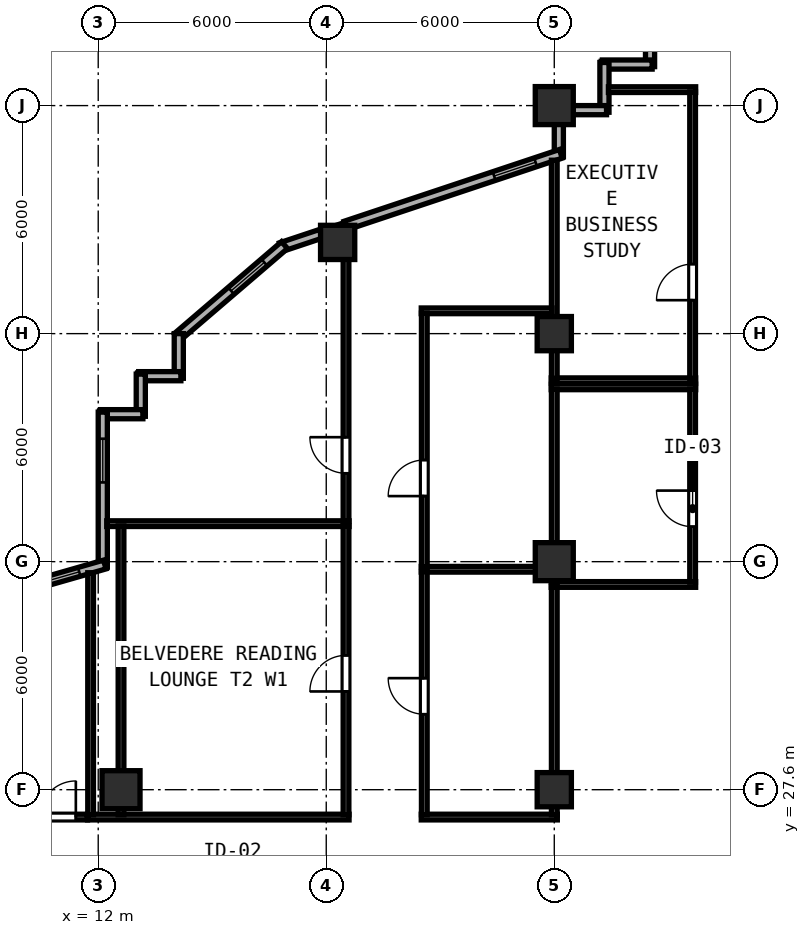
"""IFC4 building model, lengths in metres.
Left out: names, types, materials, properties, quantities, classifications, styles, units other than length and angle.
Written with IfcOpenShell. Run it as: python <this file> out.ifc"""

import sys

from ifc_helpers import new_model, si_unit, direction, frame, frame_2d, origin, origin_2d, place, context, subcontext, project, spatial, rectangle, hollow_rectangle, extrude, element, fill, save


model = new_model("IFC4")
c1 = context("Model", 3, precision=1e-05, world=origin(), true_north=direction((0.0, 1.0)))
c2 = subcontext(c1, "Body", "Model", "MODEL_VIEW")
j1 = project(units=[si_unit("LENGTHUNIT", "METRE"), si_unit("PLANEANGLEUNIT", "RADIAN")], contexts=[c1])
p1 = place(None, origin())
s1 = spatial("IfcSite", under=j1, at=p1, CompositionType="ELEMENT")
p2 = place(p1, origin())
s2 = spatial("IfcBuilding", under=s1, at=p2, CompositionType="ELEMENT")
p3 = place(p2, frame((0.0, 0.0, 128.8)))
s3 = spatial("IfcBuildingStorey", under=s2, at=p3, CompositionType="ELEMENT", Elevation=128.8)
for number, where, z_axis, x_axis in (
    (1, (24.0, 33.6, 0.0), (0.0, 0.0, 1.0), (1.0, 0.0, 0.0)),
    (2, (24.0, 45.6, 0.0), (0.0, 0.0, 1.0), (1.0, 0.0, 0.0)),
    (3, (12.6, 27.6, 0.0), (0.0, 0.0, 1.0), (1.0, 0.0, 0.0)),
):
    element("IfcColumn", number, at=place(p3, frame(where, z_axis=z_axis, x_axis=x_axis)), inside=s3, PredefinedType="COLUMN", context=c2, shape_type="SweptSolid", body=[
        extrude(hollow_rectangle(XDim=1.0, YDim=1.0, WallThickness=0.038, at=origin_2d()), origin(), (0.0, 0.0, 1.0), 3.8),
    ])
for number, where, z_axis, x_axis in (
    (4, (24.0, 27.6, 0.0), (0.0, 0.0, 1.0), (1.0, 0.0, 0.0)),
    (5, (24.0, 39.6, 0.0), (0.0, 0.0, 1.0), (1.0, 0.0, 0.0)),
    (6, (18.3, 42.0, 0.0), (0.0, 0.0, 1.0), (1.0, 0.0, 0.0)),
):
    element("IfcColumn", number, at=place(p3, frame(where, z_axis=z_axis, x_axis=x_axis)), inside=s3, PredefinedType="COLUMN", context=c2, shape_type="SweptSolid", body=[
        extrude(hollow_rectangle(XDim=0.9, YDim=0.9, WallThickness=0.034, at=origin_2d()), origin(), (0.0, 0.0, 1.0), 3.8),
    ])
p4 = place(p3, frame((26.52, 47.995, 0.0), z_axis=(0.0, 0.0, 1.0), x_axis=(0.0, -1.0, 0.0)))
e7 = element("IfcWall", 7, at=p4, inside=s3, PredefinedType="SOLIDWALL", context=c2, shape_type="SweptSolid", body=[
    extrude(rectangle(XDim=1.37, YDim=0.24, at=frame_2d((0.685, 0.0))), origin(), (0.0, 0.0, 1.0), 3.6),
])
for number, where, z_axis, x_axis in (
    (8, (26.575, 46.68, 0.0), (0.0, 0.0, 1.0), (-1.0, 0.0, 0.0)),
    (9, (25.32, 46.735, 0.0), (0.0, 0.0, 1.0), (0.0, -1.0, 0.0)),
):
    element("IfcWall", number, at=place(p3, frame(where, z_axis=z_axis, x_axis=x_axis)), inside=s3, PredefinedType="SOLIDWALL", context=c2, shape_type="SweptSolid", body=[
        extrude(rectangle(XDim=1.31, YDim=0.24, at=frame_2d((0.655, 0.0))), origin(), (0.0, 0.0, 1.0), 3.6),
    ])
p5 = place(p3, frame((25.375, 45.48, 0.0), z_axis=(0.0, 0.0, 1.0), x_axis=(-1.0, 0.0, 0.0)))
e10 = element("IfcWall", 10, at=p5, inside=s3, PredefinedType="SOLIDWALL", context=c2, shape_type="SweptSolid", body=[
    extrude(rectangle(XDim=0.883, YDim=0.24, at=frame_2d((0.441, 0.0))), origin(), (0.0, 0.0, 1.0), 3.6),
])
p6 = place(p3, frame((24.12, 45.108, 0.0), z_axis=(0.0, 0.0, 1.0), x_axis=(0.0, -1.0, 0.0)))
e11 = element("IfcWall", 11, at=p6, inside=s3, PredefinedType="SOLIDWALL", context=c2, shape_type="SweptSolid", body=[
    extrude(rectangle(XDim=0.849, YDim=0.24, at=frame_2d((0.425, 0.0))), origin(), (0.0, 0.0, 1.0), 3.145),
])
p7 = place(p3, frame((24.172, 44.331, 0.0), z_axis=(0.0, 0.0, 1.0), x_axis=(-0.948683298051, -0.316227766017, 0.0)))
e12 = element("IfcWall", 12, at=p7, inside=s3, PredefinedType="SOLIDWALL", context=c2, shape_type="SweptSolid", body=[
    extrude(rectangle(XDim=5.973, YDim=0.24, at=frame_2d((2.987, 0.0))), origin(), (0.0, 0.0, 1.0), 3.145),
])
p8 = place(p7, frame((0.7, 0.0, 0.85)))
e13 = element("IfcOpeningElement", 13, at=p8, cuts=e12, PredefinedType="OPENING", context=c2, shape_type="SweptSolid", body=[
    extrude(rectangle(XDim=1.15, YDim=1.8, at=frame_2d((0.575, 0.9))), frame((0.0, 0.13, 0.0), z_axis=(0.0, -1.0, 0.0), x_axis=(1.0, 0.0, 0.0)), (0.0, 0.0, 1.0), 0.26),
])
p9 = place(p3, frame((17.858, 42.226, 0.0), z_axis=(0.0, 0.0, 1.0), x_axis=(-0.948639166064, -0.316360131194, 0.0)))
e14 = element("IfcWall", 14, at=p9, inside=s3, PredefinedType="SOLIDWALL", context=c2, shape_type="SweptSolid", body=[
    extrude(rectangle(XDim=1.107, YDim=0.24, at=frame_2d((0.553, 0.0))), origin(), (0.0, 0.0, 1.0), 3.6),
])
p10 = place(p3, frame((16.902, 41.929, 0.0), z_axis=(0.0, 0.0, 1.0), x_axis=(-0.759275136126, -0.650769750112, 0.0)))
e15 = element("IfcWall", 15, at=p10, inside=s3, PredefinedType="SOLIDWALL", context=c2, shape_type="SweptSolid", body=[
    extrude(rectangle(XDim=3.719, YDim=0.24, at=frame_2d((1.86, 0.0))), origin(), (0.0, 0.0, 1.0), 3.6),
])
p11 = place(p10, frame((0.7, 0.0, 0.85)))
e16 = element("IfcOpeningElement", 16, at=p11, cuts=e15, PredefinedType="OPENING", context=c2, shape_type="SweptSolid", body=[
    extrude(rectangle(XDim=1.15, YDim=1.8, at=frame_2d((0.575, 0.9))), frame((0.0, 0.13, 0.0), z_axis=(0.0, -1.0, 0.0), x_axis=(1.0, 0.0, 0.0)), (0.0, 0.0, 1.0), 0.26),
])
p12 = place(p3, frame((14.12, 39.6, 0.0), z_axis=(0.0, 0.0, 1.0), x_axis=(0.0, -1.0, 0.0)))
e17 = element("IfcWall", 17, at=p12, inside=s3, PredefinedType="SOLIDWALL", context=c2, shape_type="SweptSolid", body=[
    extrude(rectangle(XDim=1.175, YDim=0.24, at=frame_2d((0.587, 0.0))), origin(), (0.0, 0.0, 1.0), 3.6),
])
p13 = place(p3, frame((14.175, 38.48, 0.0), z_axis=(0.0, 0.0, 1.0), x_axis=(-1.0, 0.0, 0.0)))
e18 = element("IfcWall", 18, at=p13, inside=s3, PredefinedType="SOLIDWALL", context=c2, shape_type="SweptSolid", body=[
    extrude(rectangle(XDim=1.11, YDim=0.24, at=frame_2d((0.555, 0.0))), origin(), (0.0, 0.0, 1.0), 3.6),
])
p14 = place(p3, frame((13.12, 38.535, 0.0), z_axis=(0.0, 0.0, 1.0), x_axis=(0.0, -1.0, 0.0)))
e19 = element("IfcWall", 19, at=p14, inside=s3, PredefinedType="SOLIDWALL", context=c2, shape_type="SweptSolid", body=[
    extrude(rectangle(XDim=1.11, YDim=0.24, at=frame_2d((0.555, 0.0))), origin(), (0.0, 0.0, 1.0), 3.6),
])
p15 = place(p3, frame((13.175, 37.48, 0.0), z_axis=(0.0, 0.0, 1.0), x_axis=(-1.0, 0.0, 0.0)))
e20 = element("IfcWall", 20, at=p15, inside=s3, PredefinedType="SOLIDWALL", context=c2, shape_type="SweptSolid", body=[
    extrude(rectangle(XDim=1.11, YDim=0.24, at=frame_2d((0.555, 0.0))), origin(), (0.0, 0.0, 1.0), 3.6),
])
p16 = place(p3, frame((12.12, 37.535, 0.0), z_axis=(0.0, 0.0, 1.0), x_axis=(0.0, -1.0, 0.0)))
e21 = element("IfcWall", 21, at=p16, inside=s3, PredefinedType="SOLIDWALL", context=c2, shape_type="SweptSolid", body=[
    extrude(rectangle(XDim=4.08, YDim=0.24, at=frame_2d((2.04, 0.0))), origin(), (0.0, 0.0, 1.0), 3.6),
])
p17 = place(p16, frame((0.7, 0.0, 0.85)))
e22 = element("IfcOpeningElement", 22, at=p17, cuts=e21, PredefinedType="OPENING", context=c2, shape_type="SweptSolid", body=[
    extrude(rectangle(XDim=1.15, YDim=1.8, at=frame_2d((0.575, 0.9))), frame((0.0, 0.13, 0.0), z_axis=(0.0, -1.0, 0.0), x_axis=(1.0, 0.0, 0.0)), (0.0, 0.0, 1.0), 0.26),
])
p18 = place(p3, frame((12.173, 33.525, 0.0), z_axis=(0.0, 0.0, 1.0), x_axis=(-0.961351601853, -0.275323623424, 0.0)))
e23 = element("IfcWall", 23, at=p18, inside=s3, PredefinedType="SOLIDWALL", context=c2, shape_type="SweptSolid", body=[
    extrude(rectangle(XDim=8.883, YDim=0.24, at=frame_2d((4.442, 0.0))), origin(), (0.0, 0.0, 1.0), 3.6),
])
p19 = place(p18, frame((0.7, 0.0, 0.85)))
e24 = element("IfcOpeningElement", 24, at=p19, cuts=e23, PredefinedType="OPENING", context=c2, shape_type="SweptSolid", body=[
    extrude(rectangle(XDim=1.15, YDim=1.8, at=frame_2d((0.575, 0.9))), frame((0.0, 0.13, 0.0), z_axis=(0.0, -1.0, 0.0), x_axis=(1.0, 0.0, 0.0)), (0.0, 0.0, 1.0), 0.26),
])
p20 = place(p18, frame((6.1, 0.0, 0.85)))
e25 = element("IfcOpeningElement", 25, at=p20, cuts=e23, PredefinedType="OPENING", context=c2, shape_type="SweptSolid", body=[
    extrude(rectangle(XDim=1.15, YDim=1.8, at=frame_2d((0.575, 0.9))), frame((0.0, 0.13, 0.0), z_axis=(0.0, -1.0, 0.0), x_axis=(1.0, 0.0, 0.0)), (0.0, 0.0, 1.0), 0.26),
])
for number, where, z_axis, x_axis in (
    (26, (23.92, 38.2, 0.0), (0.0, 0.0, 1.0), (1.0, 0.0, 0.0)),
    (27, (23.92, 33.0, 0.0), (0.0, 0.0, 1.0), (1.0, 0.0, 0.0)),
):
    element("IfcWall", number, at=place(p3, frame(where, z_axis=z_axis, x_axis=x_axis)), inside=s3, PredefinedType="PARTITIONING", context=c2, shape_type="SweptSolid", body=[
        extrude(rectangle(XDim=3.8, YDim=0.15, at=frame_2d((1.9, 0.0))), origin(), (0.0, 0.0, 1.0), 3.6),
    ])
p21 = place(p3, frame((24.0, 33.06, 0.0), z_axis=(0.0, 0.0, 1.0), x_axis=(0.0, 1.0, 0.0)))
e28 = element("IfcWall", 28, at=p21, inside=s3, PredefinedType="PARTITIONING", context=c2, shape_type="SweptSolid", body=[
    extrude(rectangle(XDim=5.08, YDim=0.15, at=frame_2d((2.54, 0.0))), origin(), (0.0, 0.0, 1.0), 3.145),
])
p22 = place(p3, frame((27.64, 33.06, 0.0), z_axis=(0.0, 0.0, 1.0), x_axis=(0.0, 1.0, 0.0)))
e29 = element("IfcWall", 29, at=p22, inside=s3, PredefinedType="PARTITIONING", context=c2, shape_type="SweptSolid", body=[
    extrude(rectangle(XDim=5.08, YDim=0.15, at=frame_2d((2.54, 0.0))), origin(), (0.0, 0.0, 1.0), 3.6),
])
p23 = place(p22, frame((2.41, 0.0, 0.0), z_axis=(0.0, 0.0, 1.0), x_axis=(-1.0, 0.0, 0.0)))
e30 = element("IfcOpeningElement", 30, at=p23, cuts=e29, PredefinedType="OPENING", context=c2, shape_type="SweptSolid", body=[
    extrude(rectangle(XDim=0.95, YDim=2.12, at=frame_2d((0.475, 1.06))), frame((0.0, 0.085, 0.0), z_axis=(0.0, -1.0, 0.0), x_axis=(1.0, 0.0, 0.0)), (0.0, 0.0, 1.0), 0.17),
])
p24 = place(p3, frame((25.425, 46.02, 0.0), z_axis=(0.0, 0.0, 1.0), x_axis=(1.0, 0.0, 0.0)))
e31 = element("IfcWall", 31, at=p24, inside=s3, PredefinedType="PARTITIONING", context=c2, shape_type="SweptSolid", body=[
    extrude(rectangle(XDim=2.295, YDim=0.15, at=frame_2d((1.147, 0.0))), origin(), (0.0, 0.0, 1.0), 3.6),
])
p25 = place(p3, frame((23.92, 38.36, 0.0), z_axis=(0.0, 0.0, 1.0), x_axis=(1.0, 0.0, 0.0)))
e32 = element("IfcWall", 32, at=p25, inside=s3, PredefinedType="PARTITIONING", context=c2, shape_type="SweptSolid", body=[
    extrude(rectangle(XDim=3.8, YDim=0.15, at=frame_2d((1.9, 0.0))), origin(), (0.0, 0.0, 1.0), 3.6),
])
p26 = place(p3, frame((24.0, 38.42, 0.0), z_axis=(0.0, 0.0, 1.0), x_axis=(0.0, 1.0, 0.0)))
e33 = element("IfcWall", 33, at=p26, inside=s3, PredefinedType="PARTITIONING", context=c2, shape_type="SweptSolid", body=[
    extrude(rectangle(XDim=5.743, YDim=0.15, at=frame_2d((2.872, 0.0))), origin(), (0.0, 0.0, 1.0), 3.145),
])
p27 = place(p3, frame((27.64, 38.42, 0.0), z_axis=(0.0, 0.0, 1.0), x_axis=(0.0, 1.0, 0.0)))
e34 = element("IfcWall", 34, at=p27, inside=s3, PredefinedType="PARTITIONING", context=c2, shape_type="SweptSolid", body=[
    extrude(rectangle(XDim=7.54, YDim=0.15, at=frame_2d((3.77, 0.0))), origin(), (0.0, 0.0, 1.0), 3.6),
])
p28 = place(p27, frame((3.01, 0.0, 0.0), z_axis=(0.0, 0.0, 1.0), x_axis=(-1.0, 0.0, 0.0)))
e35 = element("IfcOpeningElement", 35, at=p28, cuts=e34, PredefinedType="OPENING", context=c2, shape_type="SweptSolid", body=[
    extrude(rectangle(XDim=0.95, YDim=2.12, at=frame_2d((0.475, 1.06))), frame((0.0, 0.085, 0.0), z_axis=(0.0, -1.0, 0.0), x_axis=(1.0, 0.0, 0.0)), (0.0, 0.0, 1.0), 0.17),
])
p29 = place(p3, frame((12.225, 34.6, 0.0), z_axis=(0.0, 0.0, 1.0), x_axis=(1.0, 0.0, 0.0)))
e36 = element("IfcWall", 36, at=p29, inside=s3, PredefinedType="PARTITIONING", context=c2, shape_type="SweptSolid", body=[
    extrude(rectangle(XDim=6.375, YDim=0.15, at=frame_2d((3.188, 0.0))), origin(), (0.0, 0.0, 1.0), 3.6),
])
p30 = place(p3, frame((11.72, 26.88, 0.0), z_axis=(0.0, 0.0, 1.0), x_axis=(1.0, 0.0, 0.0)))
e37 = element("IfcWall", 37, at=p30, inside=s3, PredefinedType="PARTITIONING", context=c2, shape_type="SweptSolid", body=[
    extrude(rectangle(XDim=6.88, YDim=0.15, at=frame_2d((3.44, 0.0))), origin(), (0.0, 0.0, 1.0), 3.6),
])
p31 = place(p3, frame((11.8, 26.94, 0.0), z_axis=(0.0, 0.0, 1.0), x_axis=(0.0, 1.0, 0.0)))
e38 = element("IfcWall", 38, at=p31, inside=s3, PredefinedType="PARTITIONING", context=c2, shape_type="SweptSolid", body=[
    extrude(rectangle(XDim=6.369, YDim=0.15, at=frame_2d((3.184, 0.0))), origin(), (0.0, 0.0, 1.0), 3.6),
])
p32 = place(p3, frame((18.52, 26.94, 0.0), z_axis=(0.0, 0.0, 1.0), x_axis=(0.0, 1.0, 0.0)))
e39 = element("IfcWall", 39, at=p32, inside=s3, PredefinedType="PARTITIONING", context=c2, shape_type="SweptSolid", body=[
    extrude(rectangle(XDim=7.6, YDim=0.15, at=frame_2d((3.8, 0.0))), origin(), (0.0, 0.0, 1.0), 3.6),
])
p33 = place(p32, frame((4.195, 0.0, 0.0), z_axis=(0.0, 0.0, 1.0), x_axis=(-1.0, 0.0, 0.0)))
e40 = element("IfcOpeningElement", 40, at=p33, cuts=e39, PredefinedType="OPENING", context=c2, shape_type="SweptSolid", body=[
    extrude(rectangle(XDim=0.95, YDim=2.12, at=frame_2d((0.475, 1.06))), frame((0.0, 0.085, 0.0), z_axis=(0.0, -1.0, 0.0), x_axis=(1.0, 0.0, 0.0)), (0.0, 0.0, 1.0), 0.17),
])
p34 = place(p3, frame((18.52, 34.66, 0.0), z_axis=(0.0, 0.0, 1.0), x_axis=(0.0, 1.0, 0.0)))
e41 = element("IfcWall", 41, at=p34, inside=s3, PredefinedType="PARTITIONING", context=c2, shape_type="SweptSolid", body=[
    extrude(rectangle(XDim=7.676, YDim=0.15, at=frame_2d((3.838, 0.0))), origin(), (0.0, 0.0, 1.0), 3.6),
])
p35 = place(p34, frame((2.215, 0.0, 0.0), z_axis=(0.0, 0.0, 1.0), x_axis=(-1.0, 0.0, 0.0)))
e42 = element("IfcOpeningElement", 42, at=p35, cuts=e41, PredefinedType="OPENING", context=c2, shape_type="SweptSolid", body=[
    extrude(rectangle(XDim=0.95, YDim=2.12, at=frame_2d((0.475, 1.06))), frame((0.0, 0.085, 0.0), z_axis=(0.0, -1.0, 0.0), x_axis=(1.0, 0.0, 0.0)), (0.0, 0.0, 1.0), 0.17),
])
p36 = place(p3, frame((20.5, 33.4, 0.0), z_axis=(0.0, 0.0, 1.0), x_axis=(1.0, 0.0, 0.0)))
e43 = element("IfcWall", 43, at=p36, inside=s3, PredefinedType="PARTITIONING", context=c2, shape_type="SweptSolid", body=[
    extrude(rectangle(XDim=3.44, YDim=0.15, at=frame_2d((1.72, 0.0))), origin(), (0.0, 0.0, 1.0), 3.6),
])
p37 = place(p3, frame((20.5, 26.88, 0.0), z_axis=(0.0, 0.0, 1.0), x_axis=(1.0, 0.0, 0.0)))
e44 = element("IfcWall", 44, at=p37, inside=s3, PredefinedType="PARTITIONING", context=c2, shape_type="SweptSolid", body=[
    extrude(rectangle(XDim=3.58, YDim=0.15, at=frame_2d((1.79, 0.0))), origin(), (0.0, 0.0, 1.0), 3.6),
])
p38 = place(p3, frame((20.58, 26.94, 0.0), z_axis=(0.0, 0.0, 1.0), x_axis=(0.0, 1.0, 0.0)))
e45 = element("IfcWall", 45, at=p38, inside=s3, PredefinedType="PARTITIONING", context=c2, shape_type="SweptSolid", body=[
    extrude(rectangle(XDim=6.4, YDim=0.15, at=frame_2d((3.2, 0.0))), origin(), (0.0, 0.0, 1.0), 3.6),
])
p39 = place(p38, frame((2.645, 0.0, 0.0)))
e46 = element("IfcOpeningElement", 46, at=p39, cuts=e45, PredefinedType="OPENING", context=c2, shape_type="SweptSolid", body=[
    extrude(rectangle(XDim=0.95, YDim=2.12, at=frame_2d((0.475, 1.06))), frame((0.0, 0.085, 0.0), z_axis=(0.0, -1.0, 0.0), x_axis=(1.0, 0.0, 0.0)), (0.0, 0.0, 1.0), 0.17),
])
p40 = place(p3, frame((24.0, 26.94, 0.0), z_axis=(0.0, 0.0, 1.0), x_axis=(0.0, 1.0, 0.0)))
e47 = element("IfcWall", 47, at=p40, inside=s3, PredefinedType="PARTITIONING", context=c2, shape_type="SweptSolid", body=[
    extrude(rectangle(XDim=6.0, YDim=0.15, at=frame_2d((3.0, 0.0))), origin(), (0.0, 0.0, 1.0), 3.145),
])
p41 = place(p3, frame((20.5, 40.2, 0.0), z_axis=(0.0, 0.0, 1.0), x_axis=(1.0, 0.0, 0.0)))
e48 = element("IfcWall", 48, at=p41, inside=s3, PredefinedType="PARTITIONING", context=c2, shape_type="SweptSolid", body=[
    extrude(rectangle(XDim=3.44, YDim=0.15, at=frame_2d((1.72, 0.0))), origin(), (0.0, 0.0, 1.0), 3.6),
])
p42 = place(p3, frame((20.58, 33.46, 0.0), z_axis=(0.0, 0.0, 1.0), x_axis=(0.0, 1.0, 0.0)))
e49 = element("IfcWall", 49, at=p42, inside=s3, PredefinedType="PARTITIONING", context=c2, shape_type="SweptSolid", body=[
    extrude(rectangle(XDim=6.68, YDim=0.15, at=frame_2d((3.34, 0.0))), origin(), (0.0, 0.0, 1.0), 3.6),
])
p43 = place(p42, frame((1.865, 0.0, 0.0)))
e50 = element("IfcOpeningElement", 50, at=p43, cuts=e49, PredefinedType="OPENING", context=c2, shape_type="SweptSolid", body=[
    extrude(rectangle(XDim=0.95, YDim=2.12, at=frame_2d((0.475, 1.06))), frame((0.0, 0.085, 0.0), z_axis=(0.0, -1.0, 0.0), x_axis=(1.0, 0.0, 0.0)), (0.0, 0.0, 1.0), 0.17),
])
p44 = place(p3, frame((1.645, 26.88, 0.0), z_axis=(0.0, 0.0, 1.0), x_axis=(1.0, 0.0, 0.0)))
e51 = element("IfcWall", 51, at=p44, inside=s3, PredefinedType="PARTITIONING", context=c2, shape_type="SweptSolid", body=[
    extrude(rectangle(XDim=10.073, YDim=0.15, at=frame_2d((5.037, 0.0))), origin(), (0.0, 0.0, 1.0), 3.6),
])
p45 = place(p44, frame((8.816, 0.0, 0.0)))
e52 = element("IfcOpeningElement", 52, at=p45, cuts=e51, PredefinedType="OPENING", context=c2, shape_type="SweptSolid", body=[
    extrude(rectangle(XDim=0.95, YDim=2.15, at=frame_2d((0.475, 1.075))), frame((0.0, 0.085, 0.0), z_axis=(0.0, -1.0, 0.0), x_axis=(1.0, 0.0, 0.0)), (0.0, 0.0, 1.0), 0.17),
])
p46 = place(p3, frame((12.6, 26.94, 0.0), z_axis=(0.0, 0.0, 1.0), x_axis=(0.0, 1.0, 0.0)))
e53 = element("IfcWall", 53, at=p46, inside=s3, PredefinedType="PARTITIONING", context=c2, shape_type="SweptSolid", body=[
    extrude(rectangle(XDim=7.6, YDim=0.15, at=frame_2d((3.8, 0.0))), origin(), (0.0, 0.0, 1.0), 3.145),
])
p47 = place(p8, origin())
e54 = element("IfcWindow", 54, at=p47, inside=s3, PartitioningType="SINGLE_PANEL", PredefinedType="WINDOW", context=c2, shape_type="SweptSolid", body=[
    extrude(rectangle(XDim=1.15, YDim=1.8, at=frame_2d((0.575, 0.9))), frame((0.0, 0.03, 0.0), z_axis=(0.0, -1.0, 0.0), x_axis=(1.0, 0.0, 0.0)), (0.0, 0.0, 1.0), 0.06),
])
fill(e13, e54)
p48 = place(p11, origin())
e55 = element("IfcWindow", 55, at=p48, inside=s3, PartitioningType="SINGLE_PANEL", PredefinedType="WINDOW", context=c2, shape_type="SweptSolid", body=[
    extrude(rectangle(XDim=1.15, YDim=1.8, at=frame_2d((0.575, 0.9))), frame((0.0, 0.03, 0.0), z_axis=(0.0, -1.0, 0.0), x_axis=(1.0, 0.0, 0.0)), (0.0, 0.0, 1.0), 0.06),
])
fill(e16, e55)
p49 = place(p17, origin())
e56 = element("IfcWindow", 56, at=p49, inside=s3, PartitioningType="SINGLE_PANEL", PredefinedType="WINDOW", context=c2, shape_type="SweptSolid", body=[
    extrude(rectangle(XDim=1.15, YDim=1.8, at=frame_2d((0.575, 0.9))), frame((0.0, 0.03, 0.0), z_axis=(0.0, -1.0, 0.0), x_axis=(1.0, 0.0, 0.0)), (0.0, 0.0, 1.0), 0.06),
])
fill(e22, e56)
p50 = place(p19, origin())
e57 = element("IfcWindow", 57, at=p50, inside=s3, PartitioningType="SINGLE_PANEL", PredefinedType="WINDOW", context=c2, shape_type="SweptSolid", body=[
    extrude(rectangle(XDim=1.15, YDim=1.8, at=frame_2d((0.575, 0.9))), frame((0.0, 0.03, 0.0), z_axis=(0.0, -1.0, 0.0), x_axis=(1.0, 0.0, 0.0)), (0.0, 0.0, 1.0), 0.06),
])
fill(e24, e57)
p51 = place(p23, origin())
e58 = element("IfcDoor", 58, at=p51, inside=s3, OperationType="SINGLE_SWING_LEFT", PredefinedType="DOOR", context=c2, shape_type="SweptSolid", body=[
    extrude(rectangle(XDim=0.95, YDim=2.12, at=frame_2d((0.475, 1.06))), frame((0.0, 0.025, 0.0), z_axis=(0.0, -1.0, 0.0), x_axis=(1.0, 0.0, 0.0)), (0.0, 0.0, 1.0), 0.05),
])
fill(e30, e58)
p52 = place(p28, origin())
e59 = element("IfcDoor", 59, at=p52, inside=s3, OperationType="SINGLE_SWING_RIGHT", PredefinedType="DOOR", context=c2, shape_type="SweptSolid", body=[
    extrude(rectangle(XDim=0.95, YDim=2.12, at=frame_2d((0.475, 1.06))), frame((0.0, 0.025, 0.0), z_axis=(0.0, -1.0, 0.0), x_axis=(1.0, 0.0, 0.0)), (0.0, 0.0, 1.0), 0.05),
])
fill(e35, e59)
p53 = place(p33, origin())
e60 = element("IfcDoor", 60, at=p53, inside=s3, OperationType="SINGLE_SWING_RIGHT", PredefinedType="DOOR", context=c2, shape_type="SweptSolid", body=[
    extrude(rectangle(XDim=0.95, YDim=2.12, at=frame_2d((0.475, 1.06))), frame((0.0, 0.025, 0.0), z_axis=(0.0, -1.0, 0.0), x_axis=(1.0, 0.0, 0.0)), (0.0, 0.0, 1.0), 0.05),
])
fill(e40, e60)
p54 = place(p35, origin())
e61 = element("IfcDoor", 61, at=p54, inside=s3, OperationType="SINGLE_SWING_LEFT", PredefinedType="DOOR", context=c2, shape_type="SweptSolid", body=[
    extrude(rectangle(XDim=0.95, YDim=2.12, at=frame_2d((0.475, 1.06))), frame((0.0, 0.025, 0.0), z_axis=(0.0, -1.0, 0.0), x_axis=(1.0, 0.0, 0.0)), (0.0, 0.0, 1.0), 0.05),
])
fill(e42, e61)
p55 = place(p39, origin())
e62 = element("IfcDoor", 62, at=p55, inside=s3, OperationType="SINGLE_SWING_RIGHT", PredefinedType="DOOR", context=c2, shape_type="SweptSolid", body=[
    extrude(rectangle(XDim=0.95, YDim=2.12, at=frame_2d((0.475, 1.06))), frame((0.0, 0.025, 0.0), z_axis=(0.0, -1.0, 0.0), x_axis=(1.0, 0.0, 0.0)), (0.0, 0.0, 1.0), 0.05),
])
fill(e46, e62)
p56 = place(p43, origin())
e63 = element("IfcDoor", 63, at=p56, inside=s3, OperationType="SINGLE_SWING_LEFT", PredefinedType="DOOR", context=c2, shape_type="SweptSolid", body=[
    extrude(rectangle(XDim=0.95, YDim=2.12, at=frame_2d((0.475, 1.06))), frame((0.0, 0.025, 0.0), z_axis=(0.0, -1.0, 0.0), x_axis=(1.0, 0.0, 0.0)), (0.0, 0.0, 1.0), 0.05),
])
fill(e50, e63)
p57 = place(p45, origin())
e64 = element("IfcDoor", 64, at=p57, inside=s3, OperationType="SINGLE_SWING_RIGHT", PredefinedType="DOOR", context=c2, shape_type="SweptSolid", body=[
    extrude(rectangle(XDim=0.95, YDim=2.15, at=frame_2d((0.475, 1.075))), frame((0.0, 0.025, 0.0), z_axis=(0.0, -1.0, 0.0), x_axis=(1.0, 0.0, 0.0)), (0.0, 0.0, 1.0), 0.05),
])
fill(e52, e64)
save(model, sys.argv[1])
